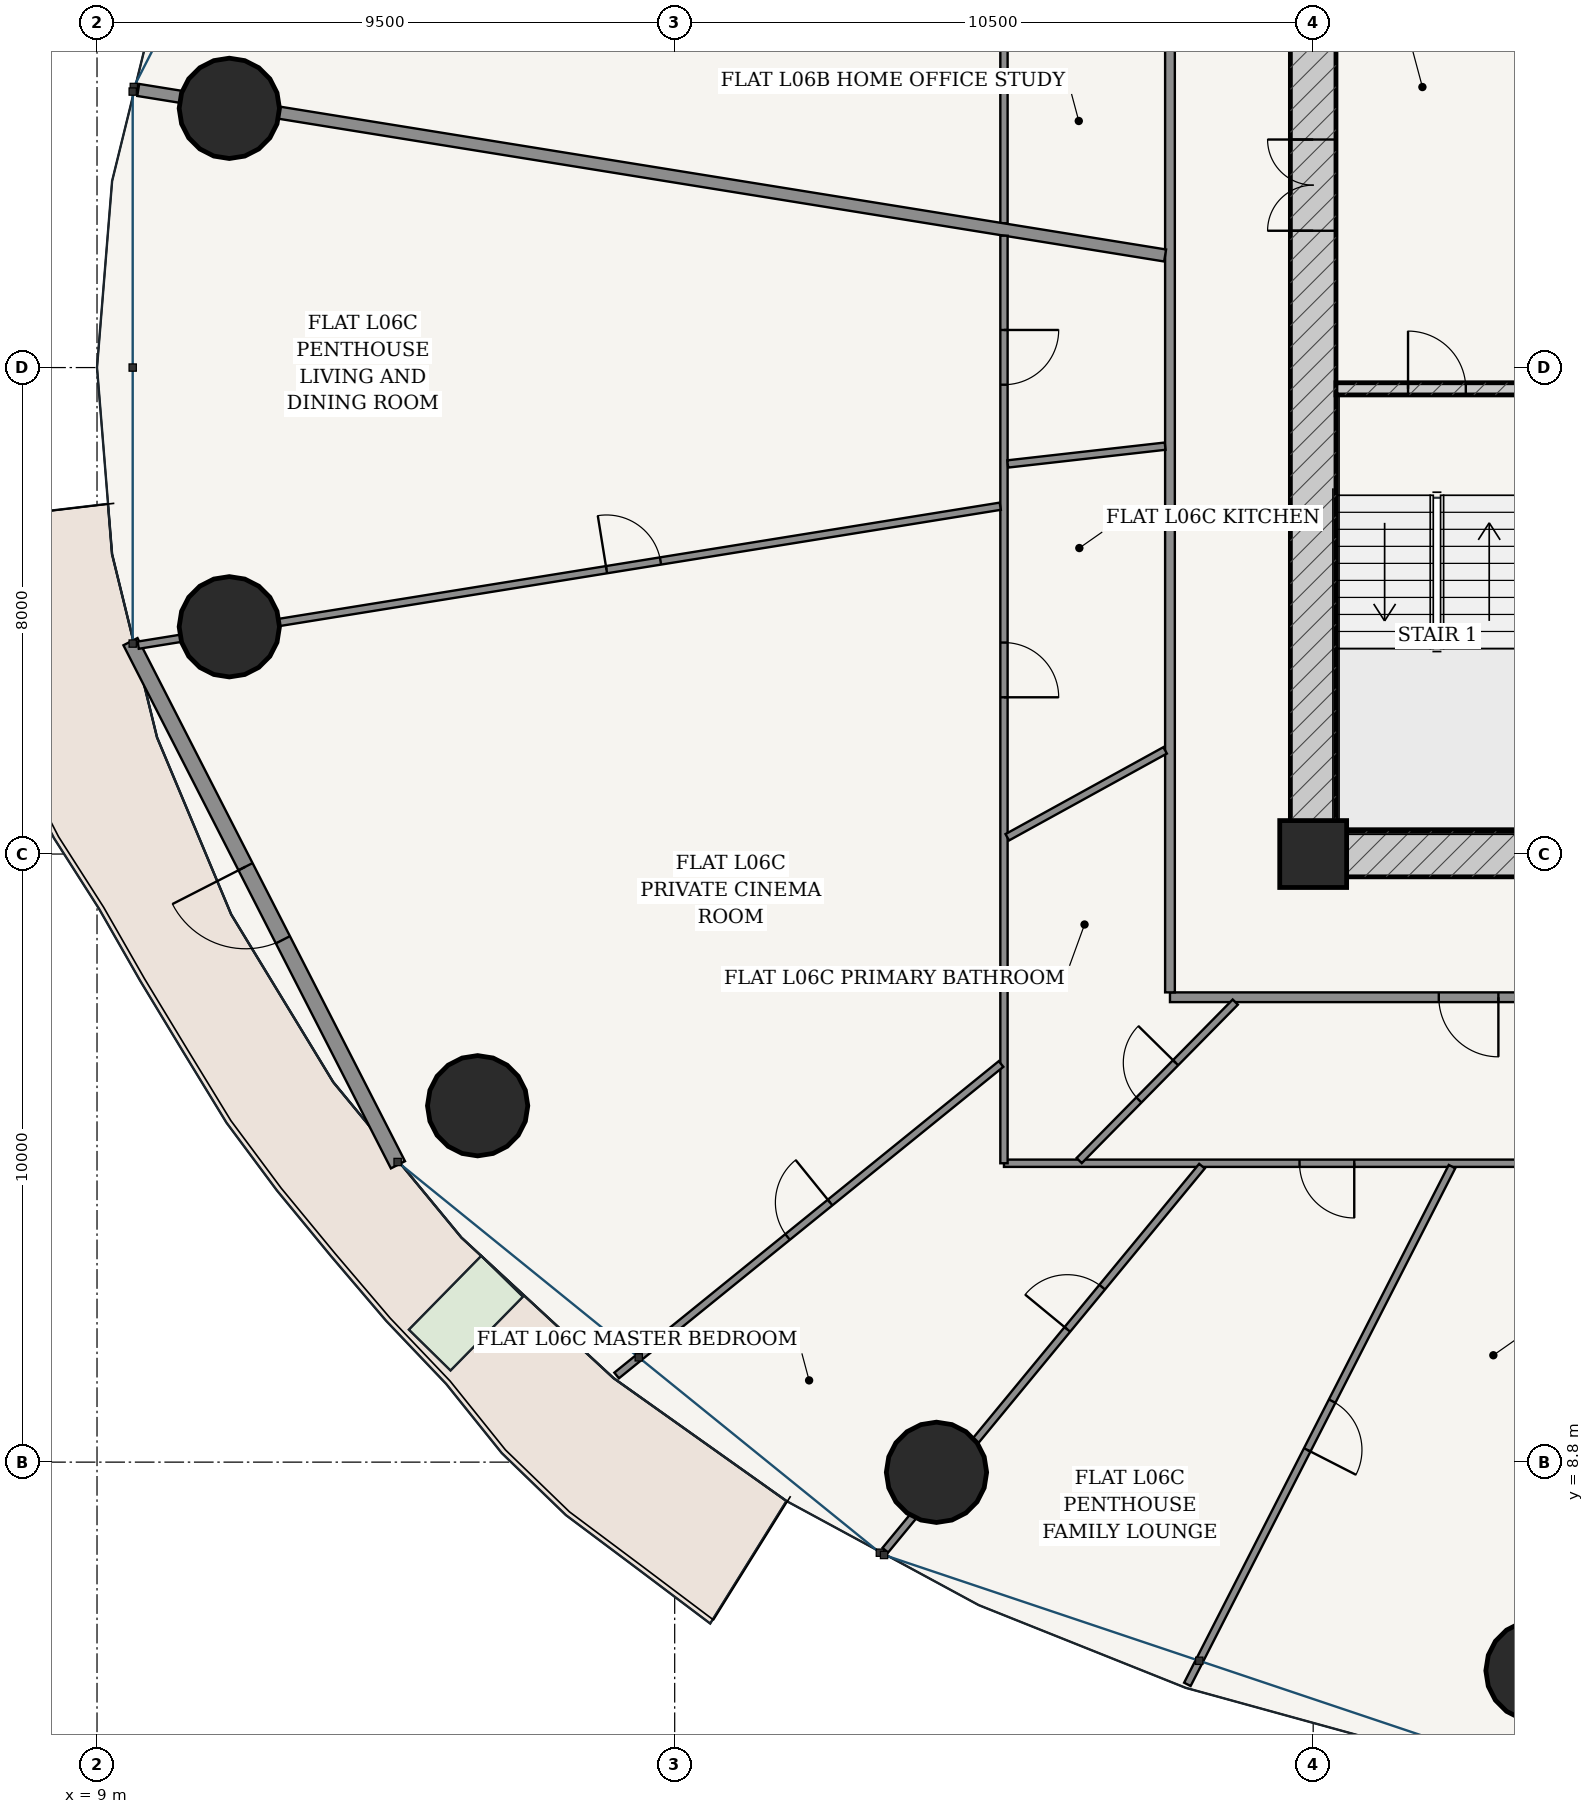
"""IFC4 building model, lengths in metres.
Left out: names, types, materials, properties, quantities, classifications, styles, units other than length and angle.
Written with IfcOpenShell. Run it as: python <this file> out.ifc"""

import sys

from ifc_helpers import new_model, si_unit, direction, frame, frame_2d, origin, origin_2d, place, context, subcontext, project, spatial, rectangle, hollow_circle, extrude, source, transform, mapped, element, fill, save


model = new_model("IFC4")
c1 = context("Model", 3, precision=1e-05, world=origin(), true_north=direction((-0.2419218956, 0.970295726276)))
c2 = subcontext(c1, "Body", "Model", "MODEL_VIEW")
j1 = project(units=[si_unit("LENGTHUNIT", "METRE"), si_unit("PLANEANGLEUNIT", "RADIAN")], contexts=[c1])
p1 = place(None, origin())
s1 = spatial("IfcSite", under=j1, at=p1, CompositionType="ELEMENT")
p2 = place(p1, origin())
s2 = spatial("IfcBuilding", under=s1, at=p2, CompositionType="ELEMENT")
p3 = place(p2, frame((0.0, 0.0, 27.6)))
s3 = spatial("IfcBuildingStorey", under=s2, at=p3, CompositionType="ELEMENT", Elevation=27.6)
p4 = place(p3, frame((29.0, 18.8, 0.0), z_axis=(0.0, 0.0, 1.0), x_axis=(1.0, 0.0, 0.0)))
e1 = element("IfcColumn", 1, at=p4, inside=s3, PredefinedType="COLUMN", context=c2, shape_type="SweptSolid", body=[
    extrude(rectangle(XDim=1.1, YDim=1.1, at=origin_2d()), origin(), (0.0, 0.0, 1.0), 3.6),
])
p5 = place(p3, frame((28.625, 18.8, 0.0), z_axis=(0.0, 0.0, 1.0), x_axis=(1.0, 0.0, 0.0)))
e2 = element("IfcWall", 2, at=p5, inside=s3, PredefinedType="SHEAR", context=c2, shape_type="SweptSolid", body=[
    extrude(rectangle(XDim=18.75, YDim=0.75, at=frame_2d((9.375, 0.0))), origin(), (0.0, 0.0, 1.0), 3.32),
])
p6 = place(p5, frame((8.95, 0.0, 0.0)))
e3 = element("IfcOpeningElement", 3, at=p6, cuts=e2, PredefinedType="OPENING", context=c2, shape_type="SweptSolid", body=[
    extrude(rectangle(XDim=0.85, YDim=2.1, at=frame_2d((0.425, 1.05))), frame((0.0, 0.385, 0.0), z_axis=(0.0, -1.0, 0.0), x_axis=(1.0, 0.0, 0.0)), (0.0, 0.0, 1.0), 0.77),
])
p7 = place(p3, frame((29.0, 19.175, 0.0), z_axis=(0.0, 0.0, 1.0), x_axis=(0.0, 1.0, 0.0)))
e4 = element("IfcWall", 4, at=p7, inside=s3, PredefinedType="SHEAR", context=c2, shape_type="SweptSolid", body=[
    extrude(rectangle(XDim=15.25, YDim=0.75, at=frame_2d((7.625, 0.0))), origin(), (0.0, 0.0, 1.0), 3.32),
])
p8 = place(p7, frame((9.875, 0.0, 0.0)))
e5 = element("IfcOpeningElement", 5, at=p8, cuts=e4, PredefinedType="OPENING", context=c2, shape_type="SweptSolid", body=[
    extrude(rectangle(XDim=1.5, YDim=2.2, at=frame_2d((0.75, 1.1))), frame((0.0, 0.385, 0.0), z_axis=(0.0, -1.0, 0.0), x_axis=(1.0, 0.0, 0.0)), (0.0, 0.0, 1.0), 0.77),
])
p9 = place(p3, frame((29.375, 26.45, 0.0), z_axis=(0.0, 0.0, 1.0), x_axis=(1.0, 0.0, 0.0)))
e6 = element("IfcWall", 6, at=p9, inside=s3, PredefinedType="SOLIDWALL", context=c2, shape_type="SweptSolid", body=[
    extrude(rectangle(XDim=3.32, YDim=0.2, at=frame_2d((1.66, 0.0))), origin(), (0.0, 0.0, 1.0), 3.32),
])
p10 = place(p9, frame((1.185, 0.0, 0.0)))
e7 = element("IfcOpeningElement", 7, at=p10, cuts=e6, PredefinedType="OPENING", context=c2, shape_type="SweptSolid", body=[
    extrude(rectangle(XDim=0.95, YDim=2.15, at=frame_2d((0.475, 1.075))), frame((0.0, 0.11, 0.0), z_axis=(0.0, -1.0, 0.0), x_axis=(1.0, 0.0, 0.0)), (0.0, 0.0, 1.0), 0.22),
])
for number, where, z_axis, x_axis in (
    (8, (11.176, 31.063, 0.0), (0.0, 0.0, 1.0), (1.0, 0.0, 0.0)),
    (9, (11.176, 22.537, 0.0), (0.0, 0.0, 1.0), (1.0, 0.0, 0.0)),
    (10, (15.259, 14.661, 0.0), (0.0, 0.0, 1.0), (1.0, 0.0, 0.0)),
    (11, (22.805, 8.632, 0.0), (0.0, 0.0, 1.0), (1.0, 0.0, 0.0)),
    (12, (32.664, 5.37, 0.0), (0.0, 0.0, 1.0), (1.0, 0.0, 0.0)),
):
    element("IfcColumn", number, at=place(p3, frame(where, z_axis=z_axis, x_axis=x_axis)), inside=s3, PredefinedType="COLUMN", context=c2, shape_type="SweptSolid", body=[
        extrude(hollow_circle(Radius=0.825, WallThickness=0.05, at=origin_2d()), origin(), (0.0, 0.0, 1.0), 3.6),
    ])
p11 = place(p3, frame((9.55, 22.292, 0.0), z_axis=(0.0, 0.0, 1.0), x_axis=(0.455220575541, -0.890378698984, 0.0)))
e13 = element("IfcWall", 13, at=p11, inside=s3, PredefinedType="SOLIDWALL", context=c2, shape_type="SweptSolid", body=[
    extrude(rectangle(XDim=9.662, YDim=0.26, at=frame_2d((4.831, 0.0))), origin(), (0.0, 0.0, 1.0), 3.32),
])
p12 = place(p11, frame((4.156, 0.0, 0.0)))
e14 = element("IfcOpeningElement", 14, at=p12, cuts=e13, PredefinedType="OPENING", context=c2, shape_type="SweptSolid", body=[
    extrude(rectangle(XDim=1.35, YDim=2.2, at=frame_2d((0.675, 1.1))), frame((0.0, 0.14, 0.0), z_axis=(0.0, -1.0, 0.0), x_axis=(1.0, 0.0, 0.0)), (0.0, 0.0, 1.0), 0.28),
])
p13 = place(p3, frame((26.645, 16.445, 0.0), z_axis=(0.0, 0.0, 1.0), x_axis=(1.0, 0.0, 0.0)))
e15 = element("IfcWall", 15, at=p13, inside=s3, PredefinedType="PARTITIONING", context=c2, shape_type="SweptSolid", body=[
    extrude(rectangle(XDim=22.71, YDim=0.16, at=frame_2d((11.355, 0.0))), origin(), (0.0, 0.0, 1.0), 2.688),
])
p14 = place(p13, frame((4.421, 0.0, 0.0)))
e16 = element("IfcOpeningElement", 16, at=p14, cuts=e15, PredefinedType="OPENING", context=c2, shape_type="SweptSolid", body=[
    extrude(rectangle(XDim=0.98, YDim=2.2, at=frame_2d((0.49, 1.1))), frame((0.0, 0.09, 0.0), z_axis=(0.0, -1.0, 0.0), x_axis=(1.0, 0.0, 0.0)), (0.0, 0.0, 1.0), 0.18),
])
p15 = place(p13, frame((16.153, 0.0, 0.0)))
e17 = element("IfcOpeningElement", 17, at=p15, cuts=e15, PredefinedType="OPENING", context=c2, shape_type="SweptSolid", body=[
    extrude(rectangle(XDim=0.98, YDim=2.2, at=frame_2d((0.49, 1.1))), frame((0.0, 0.09, 0.0), z_axis=(0.0, -1.0, 0.0), x_axis=(1.0, 0.0, 0.0)), (0.0, 0.0, 1.0), 0.18),
])
p16 = place(p3, frame((26.645, 16.525, 0.0), z_axis=(0.0, 0.0, 1.0), x_axis=(0.0, 1.0, 0.0)))
e18 = element("IfcWall", 18, at=p16, inside=s3, PredefinedType="PARTITIONING", context=c2, shape_type="SweptSolid", body=[
    extrude(rectangle(XDim=20.55, YDim=0.16, at=frame_2d((10.275, 0.0))), origin(), (0.0, 0.0, 1.0), 2.688),
])
p17 = place(p3, frame((23.915, 29.172, 0.0), z_axis=(0.0, 0.0, 1.0), x_axis=(0.0, 1.0, 0.0)))
e19 = element("IfcWall", 19, at=p17, inside=s3, PredefinedType="PARTITIONING", context=c2, shape_type="SweptSolid", body=[
    extrude(rectangle(XDim=10.713, YDim=0.12, at=frame_2d((5.356, 0.0))), origin(), (0.0, 0.0, 1.0), 2.688),
])
p18 = place(p17, frame((3.666, 0.0, 0.0)))
e20 = element("IfcOpeningElement", 20, at=p18, cuts=e19, PredefinedType="OPENING", context=c2, shape_type="SweptSolid", body=[
    extrude(rectangle(XDim=0.9, YDim=2.15, at=frame_2d((0.45, 1.075))), frame((0.0, 0.07, 0.0), z_axis=(0.0, -1.0, 0.0), x_axis=(1.0, 0.0, 0.0)), (0.0, 0.0, 1.0), 0.14),
])
p19 = place(p3, frame((26.565, 28.643, 0.0), z_axis=(0.0, 0.0, 1.0), x_axis=(-0.987255953651, 0.159140447344, 0.0)))
e21 = element("IfcWall", 21, at=p19, inside=s3, PredefinedType="PARTITIONING", context=c2, shape_type="SweptSolid", body=[
    extrude(rectangle(XDim=17.105, YDim=0.2, at=frame_2d((8.553, 0.0))), origin(), (0.0, 0.0, 1.0), 2.688),
])
p20 = place(p3, frame((34.686, 13.715, 0.0), z_axis=(0.0, 0.0, 1.0), x_axis=(-1.0, 0.0, 0.0)))
e22 = element("IfcWall", 22, at=p20, inside=s3, PredefinedType="PARTITIONING", context=c2, shape_type="SweptSolid", body=[
    extrude(rectangle(XDim=10.771, YDim=0.12, at=frame_2d((5.385, 0.0))), origin(), (0.0, 0.0, 1.0), 2.688),
])
p21 = place(p20, frame((5.01, 0.0, 0.0)))
e23 = element("IfcOpeningElement", 23, at=p21, cuts=e22, PredefinedType="OPENING", context=c2, shape_type="SweptSolid", body=[
    extrude(rectangle(XDim=0.9, YDim=2.15, at=frame_2d((0.45, 1.075))), frame((0.0, 0.07, 0.0), z_axis=(0.0, -1.0, 0.0), x_axis=(1.0, 0.0, 0.0)), (0.0, 0.0, 1.0), 0.14),
])
p22 = place(p3, frame((23.915, 13.715, 0.0), z_axis=(0.0, 0.0, 1.0), x_axis=(0.0, 1.0, 0.0)))
e24 = element("IfcWall", 24, at=p22, inside=s3, PredefinedType="PARTITIONING", context=c2, shape_type="SweptSolid", body=[
    extrude(rectangle(XDim=15.253, YDim=0.12, at=frame_2d((7.626, 0.0))), origin(), (0.0, 0.0, 1.0), 2.688),
])
p23 = place(p22, frame((7.663, 0.0, 0.0)))
e25 = element("IfcOpeningElement", 25, at=p23, cuts=e24, PredefinedType="OPENING", context=c2, shape_type="SweptSolid", body=[
    extrude(rectangle(XDim=0.9, YDim=2.15, at=frame_2d((0.45, 1.075))), frame((0.0, 0.07, 0.0), z_axis=(0.0, -1.0, 0.0), x_axis=(1.0, 0.0, 0.0)), (0.0, 0.0, 1.0), 0.14),
])
p24 = place(p22, frame((12.803, 0.0, 0.0)))
e26 = element("IfcOpeningElement", 26, at=p24, cuts=e24, PredefinedType="OPENING", context=c2, shape_type="SweptSolid", body=[
    extrude(rectangle(XDim=0.9, YDim=2.15, at=frame_2d((0.45, 1.075))), frame((0.0, 0.07, 0.0), z_axis=(0.0, -1.0, 0.0), x_axis=(1.0, 0.0, 0.0)), (0.0, 0.0, 1.0), 0.14),
])
p25 = place(p3, frame((23.854, 24.52, 0.0), z_axis=(0.0, 0.0, 1.0), x_axis=(-0.987258444847, -0.159124991997, 0.0)))
e27 = element("IfcWall", 27, at=p25, inside=s3, PredefinedType="PARTITIONING", context=c2, shape_type="SweptSolid", body=[
    extrude(rectangle(XDim=14.359, YDim=0.12, at=frame_2d((7.18, 0.0))), origin(), (0.0, 0.0, 1.0), 2.688),
])
p26 = place(p25, frame((5.659, 0.0, 0.0)))
e28 = element("IfcOpeningElement", 28, at=p26, cuts=e27, PredefinedType="OPENING", context=c2, shape_type="SweptSolid", body=[
    extrude(rectangle(XDim=0.9, YDim=2.15, at=frame_2d((0.45, 1.075))), frame((0.0, 0.07, 0.0), z_axis=(0.0, -1.0, 0.0), x_axis=(1.0, 0.0, 0.0)), (0.0, 0.0, 1.0), 0.14),
])
p27 = place(p3, frame((23.867, 15.347, 0.0), z_axis=(0.0, 0.0, 1.0), x_axis=(-0.776936623447, -0.629578814087, 0.0)))
e29 = element("IfcWall", 29, at=p27, inside=s3, PredefinedType="PARTITIONING", context=c2, shape_type="SweptSolid", body=[
    extrude(rectangle(XDim=8.136, YDim=0.12, at=frame_2d((4.068, 0.0))), origin(), (0.0, 0.0, 1.0), 2.762),
])
p28 = place(p27, frame((3.618, 0.0, 0.0)))
e30 = element("IfcOpeningElement", 30, at=p28, cuts=e29, PredefinedType="OPENING", context=c2, shape_type="SweptSolid", body=[
    extrude(rectangle(XDim=0.9, YDim=2.15, at=frame_2d((0.45, 1.075))), frame((0.0, 0.07, 0.0), z_axis=(0.0, -1.0, 0.0), x_axis=(1.0, 0.0, 0.0)), (0.0, 0.0, 1.0), 0.14),
])
p29 = place(p3, frame((27.171, 13.667, 0.0), z_axis=(0.0, 0.0, 1.0), x_axis=(-0.636177533893, -0.771542704826, 0.0)))
e31 = element("IfcWall", 31, at=p29, inside=s3, PredefinedType="PARTITIONING", context=c2, shape_type="SweptSolid", body=[
    extrude(rectangle(XDim=8.187, YDim=0.12, at=frame_2d((4.093, 0.0))), origin(), (0.0, 0.0, 1.0), 2.688),
])
p30 = place(p29, frame((2.579, 0.0, 0.0)))
e32 = element("IfcOpeningElement", 32, at=p30, cuts=e31, PredefinedType="OPENING", context=c2, shape_type="SweptSolid", body=[
    extrude(rectangle(XDim=0.9, YDim=2.15, at=frame_2d((0.45, 1.075))), frame((0.0, 0.07, 0.0), z_axis=(0.0, -1.0, 0.0), x_axis=(1.0, 0.0, 0.0)), (0.0, 0.0, 1.0), 0.14),
])
p31 = place(p3, frame((31.283, 13.66, 0.0), z_axis=(0.0, 0.0, 1.0), x_axis=(-0.455131303234, -0.890424335256, 0.0)))
e33 = element("IfcWall", 33, at=p31, inside=s3, PredefinedType="PARTITIONING", context=c2, shape_type="SweptSolid", body=[
    extrude(rectangle(XDim=9.562, YDim=0.12, at=frame_2d((4.781, 0.0))), origin(), (0.0, 0.0, 1.0), 2.762),
])
p32 = place(p31, frame((4.331, 0.0, 0.0)))
e34 = element("IfcOpeningElement", 34, at=p32, cuts=e33, PredefinedType="OPENING", context=c2, shape_type="SweptSolid", body=[
    extrude(rectangle(XDim=0.9, YDim=2.15, at=frame_2d((0.45, 1.075))), frame((0.0, 0.07, 0.0), z_axis=(0.0, -1.0, 0.0), x_axis=(1.0, 0.0, 0.0)), (0.0, 0.0, 1.0), 0.14),
])
p33 = place(p3, frame((26.565, 25.507, 0.0), z_axis=(0.0, 0.0, 1.0), x_axis=(-0.993676271227, -0.112282981789, 0.0)))
e35 = element("IfcWall", 35, at=p33, inside=s3, PredefinedType="PARTITIONING", context=c2, shape_type="SweptSolid", body=[
    extrude(rectangle(XDim=2.605, YDim=0.12, at=frame_2d((1.302, 0.0))), origin(), (0.0, 0.0, 1.0), 3.32),
])
p34 = place(p3, frame((26.565, 20.505, 0.0), z_axis=(0.0, 0.0, 1.0), x_axis=(-0.876027961584, -0.482260314066, 0.0)))
e36 = element("IfcWall", 36, at=p34, inside=s3, PredefinedType="PARTITIONING", context=c2, shape_type="SweptSolid", body=[
    extrude(rectangle(XDim=2.963, YDim=0.12, at=frame_2d((1.481, 0.0))), origin(), (0.0, 0.0, 1.0), 2.688),
])
p35 = place(p3, frame((27.719, 16.365, 0.0), z_axis=(0.0, 0.0, 1.0), x_axis=(-0.701848204267, -0.712326539002, 0.0)))
e37 = element("IfcWall", 37, at=p35, inside=s3, PredefinedType="PARTITIONING", context=c2, shape_type="SweptSolid", body=[
    extrude(rectangle(XDim=3.658, YDim=0.12, at=frame_2d((1.829, 0.0))), origin(), (0.0, 0.0, 1.0), 2.688),
])
p36 = place(p35, frame((1.399, 0.0, 0.0)))
e38 = element("IfcOpeningElement", 38, at=p36, cuts=e37, PredefinedType="OPENING", context=c2, shape_type="SweptSolid", body=[
    extrude(rectangle(XDim=0.86, YDim=2.15, at=frame_2d((0.43, 1.075))), frame((0.0, 0.07, 0.0), z_axis=(0.0, -1.0, 0.0), x_axis=(1.0, 0.0, 0.0)), (0.0, 0.0, 1.0), 0.14),
])
p37 = place(p3, frame((35.438, 16.365, 0.0), z_axis=(0.0, 0.0, 1.0), x_axis=(-0.238380116209, -0.971171931326, 0.0)))
e39 = element("IfcWall", 39, at=p37, inside=s3, PredefinedType="PARTITIONING", context=c2, shape_type="SweptSolid", body=[
    extrude(rectangle(XDim=12.877, YDim=0.2, at=frame_2d((6.438, 0.0))), origin(), (0.0, 0.0, 1.0), 2.688),
])
m1 = source(origin(), c2, "Body", "SweptSolid", [
    extrude(rectangle(XDim=1.35, YDim=2.2, at=frame_2d((0.675, 1.1))), frame((0.0, 0.025, 0.0), z_axis=(0.0, -1.0, 0.0), x_axis=(1.0, 0.0, 0.0)), (0.0, 0.0, 1.0), 0.05),
])
p38 = place(p12, frame((1.35, 0.0, 0.0), z_axis=(0.0, 0.0, 1.0), x_axis=(-1.0, 0.0, 0.0)))
e40 = element("IfcDoor", 40, at=p38, inside=s3, OperationType="SINGLE_SWING_RIGHT", PredefinedType="DOOR", context=c2, shape_type="MappedRepresentation", body=[
    mapped(m1, transform((0.0, 0.0, 0.0), scale=1.0)),
])
fill(e14, e40)
m2 = source(origin(), c2, "Body", "SweptSolid", [
    extrude(rectangle(XDim=1.5, YDim=2.2, at=frame_2d((0.75, 1.1))), frame((0.0, 0.025, 0.0), z_axis=(0.0, -1.0, 0.0), x_axis=(1.0, 0.0, 0.0)), (0.0, 0.0, 1.0), 0.05),
])
p39 = place(p8, origin())
e41 = element("IfcDoor", 41, at=p39, inside=s3, OperationType="DOUBLE_DOOR_SINGLE_SWING", PredefinedType="DOOR", context=c2, shape_type="MappedRepresentation", body=[
    mapped(m2, transform((0.0, 0.0, 0.0), scale=1.0)),
])
fill(e5, e41)
m3 = source(origin(), c2, "Body", "SweptSolid", [
    extrude(rectangle(XDim=0.95, YDim=2.15, at=frame_2d((0.475, 1.075))), frame((0.0, 0.025, 0.0), z_axis=(0.0, -1.0, 0.0), x_axis=(1.0, 0.0, 0.0)), (0.0, 0.0, 1.0), 0.05),
])
p40 = place(p10, origin())
e42 = element("IfcDoor", 42, at=p40, inside=s3, OperationType="SINGLE_SWING_LEFT", PredefinedType="DOOR", context=c2, shape_type="MappedRepresentation", body=[
    mapped(m3, transform((0.0, 0.0, 0.0), scale=1.0)),
])
fill(e7, e42)
m4 = source(origin(), c2, "Body", "SweptSolid", [
    extrude(rectangle(XDim=0.98, YDim=2.2, at=frame_2d((0.49, 1.1))), frame((0.0, 0.025, 0.0), z_axis=(0.0, -1.0, 0.0), x_axis=(1.0, 0.0, 0.0)), (0.0, 0.0, 1.0), 0.05),
])
p41 = place(p14, frame((0.98, 0.0, 0.0), z_axis=(0.0, 0.0, 1.0), x_axis=(-1.0, 0.0, 0.0)))
e43 = element("IfcDoor", 43, at=p41, inside=s3, OperationType="SINGLE_SWING_LEFT", PredefinedType="DOOR", context=c2, shape_type="MappedRepresentation", body=[
    mapped(m4, transform((0.0, 0.0, 0.0), scale=1.0)),
])
fill(e16, e43)
m5 = source(origin(), c2, "Body", "SweptSolid", [
    extrude(rectangle(XDim=0.86, YDim=2.15, at=frame_2d((0.43, 1.075))), frame((0.0, 0.025, 0.0), z_axis=(0.0, -1.0, 0.0), x_axis=(1.0, 0.0, 0.0)), (0.0, 0.0, 1.0), 0.05),
])
p42 = place(p36, frame((0.86, 0.0, 0.0), z_axis=(0.0, 0.0, 1.0), x_axis=(-1.0, 0.0, 0.0)))
e44 = element("IfcDoor", 44, at=p42, inside=s3, OperationType="SINGLE_SWING_RIGHT", PredefinedType="DOOR", context=c2, shape_type="MappedRepresentation", body=[
    mapped(m5, transform((0.0, 0.0, 0.0), scale=1.0)),
])
fill(e38, e44)
m6 = source(origin(), c2, "Body", "SweptSolid", [
    extrude(rectangle(XDim=0.9, YDim=2.15, at=frame_2d((0.45, 1.075))), frame((0.0, 0.025, 0.0), z_axis=(0.0, -1.0, 0.0), x_axis=(1.0, 0.0, 0.0)), (0.0, 0.0, 1.0), 0.05),
])
p43 = place(p21, origin())
e45 = element("IfcDoor", 45, at=p43, inside=s3, OperationType="SINGLE_SWING_LEFT", PredefinedType="DOOR", context=c2, shape_type="MappedRepresentation", body=[
    mapped(m6, transform((0.0, 0.0, 0.0), scale=1.0)),
])
fill(e23, e45)
p44 = place(p32, origin())
e46 = element("IfcDoor", 46, at=p44, inside=s3, OperationType="SINGLE_SWING_RIGHT", PredefinedType="DOOR", context=c2, shape_type="MappedRepresentation", body=[
    mapped(m6, transform((0.0, 0.0, 0.0), scale=1.0)),
])
fill(e34, e46)
p45 = place(p30, frame((0.9, 0.0, 0.0), z_axis=(0.0, 0.0, 1.0), x_axis=(-1.0, 0.0, 0.0)))
e47 = element("IfcDoor", 47, at=p45, inside=s3, OperationType="SINGLE_SWING_LEFT", PredefinedType="DOOR", context=c2, shape_type="MappedRepresentation", body=[
    mapped(m6, transform((0.0, 0.0, 0.0), scale=1.0)),
])
fill(e32, e47)
p46 = place(p28, frame((0.9, 0.0, 0.0), z_axis=(0.0, 0.0, 1.0), x_axis=(-1.0, 0.0, 0.0)))
e48 = element("IfcDoor", 48, at=p46, inside=s3, OperationType="SINGLE_SWING_RIGHT", PredefinedType="DOOR", context=c2, shape_type="MappedRepresentation", body=[
    mapped(m6, transform((0.0, 0.0, 0.0), scale=1.0)),
])
fill(e30, e48)
p47 = place(p26, frame((0.9, 0.0, 0.0), z_axis=(0.0, 0.0, 1.0), x_axis=(-1.0, 0.0, 0.0)))
e49 = element("IfcDoor", 49, at=p47, inside=s3, OperationType="SINGLE_SWING_LEFT", PredefinedType="DOOR", context=c2, shape_type="MappedRepresentation", body=[
    mapped(m6, transform((0.0, 0.0, 0.0), scale=1.0)),
])
fill(e28, e49)
p48 = place(p23, frame((0.9, 0.0, 0.0), z_axis=(0.0, 0.0, 1.0), x_axis=(-1.0, 0.0, 0.0)))
e50 = element("IfcDoor", 50, at=p48, inside=s3, OperationType="SINGLE_SWING_RIGHT", PredefinedType="DOOR", context=c2, shape_type="MappedRepresentation", body=[
    mapped(m6, transform((0.0, 0.0, 0.0), scale=1.0)),
])
fill(e25, e50)
p49 = place(p24, frame((0.9, 0.0, 0.0), z_axis=(0.0, 0.0, 1.0), x_axis=(-1.0, 0.0, 0.0)))
e51 = element("IfcDoor", 51, at=p49, inside=s3, OperationType="SINGLE_SWING_LEFT", PredefinedType="DOOR", context=c2, shape_type="MappedRepresentation", body=[
    mapped(m6, transform((0.0, 0.0, 0.0), scale=1.0)),
])
fill(e26, e51)
save(model, sys.argv[1])
